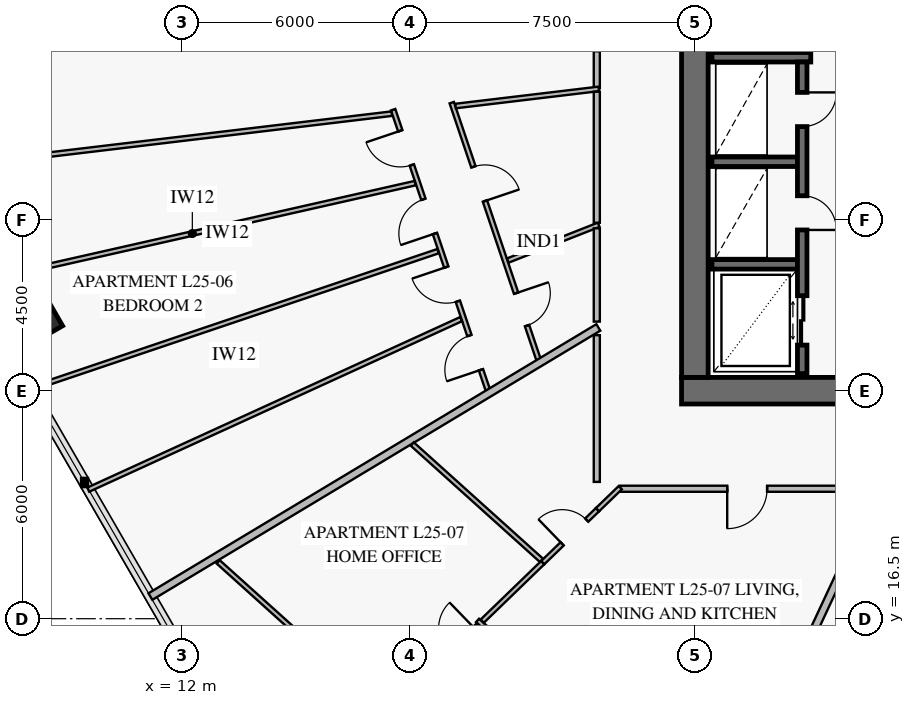
"""IFC4 building model, lengths in metres.
Left out: names, types, materials, properties, quantities, classifications, styles, units other than length and angle.
Written with IfcOpenShell. Run it as: python <this file> out.ifc"""

import sys

from ifc_helpers import new_model, si_unit, direction, frame, frame_2d, origin, origin_2d, place, context, subcontext, project, spatial, rectangle, extrude, element, fill, save


model = new_model("IFC4")
c1 = context("Model", 3, precision=1e-05, world=origin(), true_north=direction((0.0, 1.0)))
c2 = subcontext(c1, "Body", "Model", "MODEL_VIEW")
j1 = project(units=[si_unit("LENGTHUNIT", "METRE"), si_unit("PLANEANGLEUNIT", "RADIAN")], contexts=[c1])
p1 = place(None, origin())
s1 = spatial("IfcSite", under=j1, at=p1, CompositionType="ELEMENT")
p2 = place(p1, origin())
s2 = spatial("IfcBuilding", under=s1, at=p2, CompositionType="ELEMENT")
p3 = place(p2, frame((0.0, 0.0, 103.8)))
s3 = spatial("IfcBuildingStorey", under=s2, at=p3, CompositionType="ELEMENT", Elevation=103.8)
p4 = place(p3, frame((25.15, 22.5, 0.0), z_axis=(0.0, 0.0, 1.0), x_axis=(1.0, 0.0, 0.0)))
e1 = element("IfcWall", 1, at=p4, inside=s3, PredefinedType="SHEAR", context=c2, shape_type="SweptSolid", body=[
    extrude(rectangle(XDim=9.9, YDim=0.7, at=frame_2d((4.95, 0.0))), origin(), (0.0, 0.0, 1.0), 3.8),
])
p5 = place(p4, frame((4.25, 0.0, 0.0)))
e2 = element("IfcOpeningElement", 2, at=p5, cuts=e1, PredefinedType="OPENING", context=c2, shape_type="SweptSolid", body=[
    extrude(rectangle(XDim=1.5, YDim=2.15, at=frame_2d((0.75, 1.075))), frame((0.0, 0.362, 0.0), z_axis=(0.0, -1.0, 0.0), x_axis=(1.0, 0.0, 0.0)), (0.0, 0.0, 1.0), 0.724),
])
p6 = place(p3, frame((25.5, 22.85, 0.0), z_axis=(0.0, 0.0, 1.0), x_axis=(0.0, 1.0, 0.0)))
e3 = element("IfcWall", 3, at=p6, inside=s3, PredefinedType="SHEAR", context=c2, shape_type="SweptSolid", body=[
    extrude(rectangle(XDim=18.3, YDim=0.7, at=frame_2d((9.15, 0.0))), origin(), (0.0, 0.0, 1.0), 3.8),
])
p7 = place(p6, frame((8.9, 0.0, 0.0)))
e4 = element("IfcOpeningElement", 4, at=p7, cuts=e3, PredefinedType="OPENING", context=c2, shape_type="SweptSolid", body=[
    extrude(rectangle(XDim=1.1, YDim=2.15, at=frame_2d((0.55, 1.075))), frame((0.0, 0.362, 0.0), z_axis=(0.0, -1.0, 0.0), x_axis=(1.0, 0.0, 0.0)), (0.0, 0.0, 1.0), 0.724),
])
p8 = place(p3, frame((8.111, 24.408, 0.0), z_axis=(0.0, 0.0, 1.0), x_axis=(0.5, -0.866025403784, 0.0)))
e5 = element("IfcColumn", 5, at=p8, inside=s3, PredefinedType="COLUMN", context=c2, shape_type="SweptSolid", body=[
    extrude(rectangle(XDim=1.1, YDim=1.1, at=origin_2d()), origin(), (0.0, 0.0, 1.0), 3.55),
])
p9 = place(p3, frame((25.95, 31.275, 0.0), z_axis=(0.0, 0.0, 1.0), x_axis=(1.0, 0.0, 0.0)))
e6 = element("IfcWall", 6, at=p9, inside=s3, PredefinedType="SOLIDWALL", context=c2, shape_type="SweptSolid", body=[
    extrude(rectangle(XDim=20.1, YDim=0.25, at=frame_2d((10.05, 0.0))), origin(), (0.0, 0.0, 1.0), 3.8),
])
p10 = place(p9, frame((2.6, 0.0, 0.0)))
e7 = element("IfcOpeningElement", 7, at=p10, cuts=e6, PredefinedType="OPENING", context=c2, shape_type="SweptSolid", body=[
    extrude(rectangle(XDim=1.1, YDim=2.15, at=frame_2d((0.55, 1.075))), frame((0.0, 0.137, 0.0), z_axis=(0.0, -1.0, 0.0), x_axis=(1.0, 0.0, 0.0)), (0.0, 0.0, 1.0), 0.274),
])
p11 = place(p9, frame((10.6, 0.0, 0.0)))
e8 = element("IfcOpeningElement", 8, at=p11, cuts=e6, PredefinedType="OPENING", context=c2, shape_type="SweptSolid", body=[
    extrude(rectangle(XDim=1.1, YDim=2.15, at=frame_2d((0.55, 1.075))), frame((0.0, 0.137, 0.0), z_axis=(0.0, -1.0, 0.0), x_axis=(1.0, 0.0, 0.0)), (0.0, 0.0, 1.0), 0.274),
])
p12 = place(p9, frame((16.35, 0.0, 0.0)))
e9 = element("IfcOpeningElement", 9, at=p12, cuts=e6, PredefinedType="OPENING", context=c2, shape_type="SweptSolid", body=[
    extrude(rectangle(XDim=1.1, YDim=2.15, at=frame_2d((0.55, 1.075))), frame((0.0, 0.137, 0.0), z_axis=(0.0, -1.0, 0.0), x_axis=(1.0, 0.0, 0.0)), (0.0, 0.0, 1.0), 0.274),
])
for number, where, z_axis, x_axis in (
    (10, (25.95, 25.825, 0.0), (0.0, 0.0, 1.0), (1.0, 0.0, 0.0)),
    (11, (25.95, 28.525, 0.0), (0.0, 0.0, 1.0), (1.0, 0.0, 0.0)),
):
    element("IfcWall", number, at=place(p3, frame(where, z_axis=z_axis, x_axis=x_axis)), inside=s3, PredefinedType="SOLIDWALL", context=c2, shape_type="SweptSolid", body=[
        extrude(rectangle(XDim=2.25, YDim=0.25, at=frame_2d((1.125, 0.0))), origin(), (0.0, 0.0, 1.0), 3.8),
    ])
p13 = place(p3, frame((28.325, 22.95, 0.0), z_axis=(0.0, 0.0, 1.0), x_axis=(0.0, 1.0, 0.0)))
e12 = element("IfcWall", 12, at=p13, inside=s3, PredefinedType="SOLIDWALL", context=c2, shape_type="SweptSolid", body=[
    extrude(rectangle(XDim=8.2, YDim=0.25, at=frame_2d((4.1, 0.0))), origin(), (0.0, 0.0, 1.0), 3.8),
])
p14 = place(p13, frame((0.75, 0.0, 0.0)))
e13 = element("IfcOpeningElement", 13, at=p14, cuts=e12, PredefinedType="OPENING", context=c2, shape_type="SweptSolid", body=[
    extrude(rectangle(XDim=1.3, YDim=2.3, at=frame_2d((0.65, 1.15))), frame((0.0, 0.137, 0.0), z_axis=(0.0, -1.0, 0.0), x_axis=(1.0, 0.0, 0.0)), (0.0, 0.0, 1.0), 0.274),
])
p15 = place(p13, frame((3.78, 0.0, 0.0)))
e14 = element("IfcOpeningElement", 14, at=p15, cuts=e12, PredefinedType="OPENING", context=c2, shape_type="SweptSolid", body=[
    extrude(rectangle(XDim=0.9, YDim=2.1, at=frame_2d((0.45, 1.05))), frame((0.0, 0.137, 0.0), z_axis=(0.0, -1.0, 0.0), x_axis=(1.0, 0.0, 0.0)), (0.0, 0.0, 1.0), 0.274),
])
p16 = place(p13, frame((6.5, 0.0, 0.0)))
e15 = element("IfcOpeningElement", 15, at=p16, cuts=e12, PredefinedType="OPENING", context=c2, shape_type="SweptSolid", body=[
    extrude(rectangle(XDim=0.9, YDim=2.1, at=frame_2d((0.45, 1.05))), frame((0.0, 0.137, 0.0), z_axis=(0.0, -1.0, 0.0), x_axis=(1.0, 0.0, 0.0)), (0.0, 0.0, 1.0), 0.274),
])
p17 = place(p3, frame((19.103, 30.08, 0.0), z_axis=(0.0, 0.0, 1.0), x_axis=(0.319961945867, -0.947430394909, 0.0)))
e16 = element("IfcWall", 16, at=p17, inside=s3, PredefinedType="PARTITIONING", context=c2, shape_type="SweptSolid", body=[
    extrude(rectangle(XDim=7.174, YDim=0.12, at=frame_2d((3.587, 0.0))), origin(), (0.0, 0.0, 1.0), 2.85),
])
p18 = place(p17, frame((1.782, 0.0, 0.0)))
e17 = element("IfcOpeningElement", 17, at=p18, cuts=e16, PredefinedType="OPENING", context=c2, shape_type="SweptSolid", body=[
    extrude(rectangle(XDim=0.95, YDim=2.1, at=frame_2d((0.475, 1.05))), frame((0.0, 0.072, 0.0), z_axis=(0.0, -1.0, 0.0), x_axis=(1.0, 0.0, 0.0)), (0.0, 0.0, 1.0), 0.144),
])
p19 = place(p17, frame((5.292, 0.0, 0.0)))
e18 = element("IfcOpeningElement", 18, at=p19, cuts=e16, PredefinedType="OPENING", context=c2, shape_type="SweptSolid", body=[
    extrude(rectangle(XDim=0.9, YDim=2.1, at=frame_2d((0.45, 1.05))), frame((0.0, 0.072, 0.0), z_axis=(0.0, -1.0, 0.0), x_axis=(1.0, 0.0, 0.0)), (0.0, 0.0, 1.0), 0.144),
])
p20 = place(p3, frame((17.561, 29.896, 0.0), z_axis=(0.0, 0.0, 1.0), x_axis=(0.319947688878, -0.947435209596, 0.0)))
e19 = element("IfcWall", 19, at=p20, inside=s3, PredefinedType="PARTITIONING", context=c2, shape_type="SweptSolid", body=[
    extrude(rectangle(XDim=7.812, YDim=0.12, at=frame_2d((3.906, 0.0))), origin(), (0.0, 0.0, 1.0), 2.85),
])
p21 = place(p20, frame((0.587, 0.0, 0.0)))
e20 = element("IfcOpeningElement", 20, at=p21, cuts=e19, PredefinedType="OPENING", context=c2, shape_type="SweptSolid", body=[
    extrude(rectangle(XDim=0.95, YDim=2.1, at=frame_2d((0.475, 1.05))), frame((0.0, 0.072, 0.0), z_axis=(0.0, -1.0, 0.0), x_axis=(1.0, 0.0, 0.0)), (0.0, 0.0, 1.0), 0.144),
])
p22 = place(p20, frame((2.49, 0.0, 0.0)))
e21 = element("IfcOpeningElement", 21, at=p22, cuts=e19, PredefinedType="OPENING", context=c2, shape_type="SweptSolid", body=[
    extrude(rectangle(XDim=0.95, YDim=2.1, at=frame_2d((0.475, 1.05))), frame((0.0, 0.072, 0.0), z_axis=(0.0, -1.0, 0.0), x_axis=(1.0, 0.0, 0.0)), (0.0, 0.0, 1.0), 0.144),
])
p23 = place(p20, frame((4.372, 0.0, 0.0)))
e22 = element("IfcOpeningElement", 22, at=p23, cuts=e19, PredefinedType="OPENING", context=c2, shape_type="SweptSolid", body=[
    extrude(rectangle(XDim=0.95, YDim=2.1, at=frame_2d((0.475, 1.05))), frame((0.0, 0.072, 0.0), z_axis=(0.0, -1.0, 0.0), x_axis=(1.0, 0.0, 0.0)), (0.0, 0.0, 1.0), 0.144),
])
p24 = place(p20, frame((6.274, 0.0, 0.0)))
e23 = element("IfcOpeningElement", 23, at=p24, cuts=e19, PredefinedType="OPENING", context=c2, shape_type="SweptSolid", body=[
    extrude(rectangle(XDim=0.95, YDim=2.1, at=frame_2d((0.475, 1.05))), frame((0.0, 0.072, 0.0), z_axis=(0.0, -1.0, 0.0), x_axis=(1.0, 0.0, 0.0)), (0.0, 0.0, 1.0), 0.144),
])
p25 = place(p3, frame((22.92, 33.47, 0.0), z_axis=(0.0, 0.0, 1.0), x_axis=(0.0, -1.0, 0.0)))
e24 = element("IfcWall", 24, at=p25, inside=s3, PredefinedType="PARTITIONING", context=c2, shape_type="SweptSolid", body=[
    extrude(rectangle(XDim=3.014, YDim=0.16, at=frame_2d((1.507, 0.0))), origin(), (0.0, 0.0, 1.0), 3.55),
])
p26 = place(p25, frame((0.982, 0.0, 0.0)))
e25 = element("IfcOpeningElement", 25, at=p26, cuts=e24, PredefinedType="OPENING", context=c2, shape_type="SweptSolid", body=[
    extrude(rectangle(XDim=1.05, YDim=2.15, at=frame_2d((0.525, 1.075))), frame((0.0, 0.092, 0.0), z_axis=(0.0, -1.0, 0.0), x_axis=(1.0, 0.0, 0.0)), (0.0, 0.0, 1.0), 0.184),
])
p27 = place(p3, frame((19.781, 16.455, 0.0), z_axis=(0.0, 0.0, 1.0), x_axis=(0.743143681273, -0.669131877125, 0.0)))
e26 = element("IfcWall", 26, at=p27, inside=s3, PredefinedType="PARTITIONING", context=c2, shape_type="SweptSolid", body=[
    extrude(rectangle(XDim=8.392, YDim=0.12, at=frame_2d((4.196, 0.0))), origin(), (0.0, 0.0, 1.0), 2.85),
])
p28 = place(p27, frame((0.989, 0.0, 0.0)))
e27 = element("IfcOpeningElement", 27, at=p28, cuts=e26, PredefinedType="OPENING", context=c2, shape_type="SweptSolid", body=[
    extrude(rectangle(XDim=0.95, YDim=2.1, at=frame_2d((0.475, 1.05))), frame((0.0, 0.072, 0.0), z_axis=(0.0, -1.0, 0.0), x_axis=(1.0, 0.0, 0.0)), (0.0, 0.0, 1.0), 0.144),
])
p29 = place(p27, frame((4.945, 0.0, 0.0)))
e28 = element("IfcOpeningElement", 28, at=p29, cuts=e26, PredefinedType="OPENING", context=c2, shape_type="SweptSolid", body=[
    extrude(rectangle(XDim=0.95, YDim=2.1, at=frame_2d((0.475, 1.05))), frame((0.0, 0.072, 0.0), z_axis=(0.0, -1.0, 0.0), x_axis=(1.0, 0.0, 0.0)), (0.0, 0.0, 1.0), 0.144),
])
p30 = place(p3, frame((22.938, 19.368, 0.0), z_axis=(0.0, 0.0, 1.0), x_axis=(-0.718812006411, -0.695204501884, 0.0)))
e29 = element("IfcWall", 29, at=p30, inside=s3, PredefinedType="PARTITIONING", context=c2, shape_type="SweptSolid", body=[
    extrude(rectangle(XDim=2.006, YDim=0.12, at=frame_2d((1.003, 0.0))), origin(), (0.0, 0.0, 1.0), 3.55),
])
p31 = place(p30, frame((0.393, 0.0, 0.0)))
e30 = element("IfcOpeningElement", 30, at=p31, cuts=e29, PredefinedType="OPENING", context=c2, shape_type="SweptSolid", body=[
    extrude(rectangle(XDim=0.9, YDim=2.1, at=frame_2d((0.45, 1.05))), frame((0.0, 0.072, 0.0), z_axis=(0.0, -1.0, 0.0), x_axis=(1.0, 0.0, 0.0)), (0.0, 0.0, 1.0), 0.144),
])
p32 = place(p3, frame((21.496, 17.974, 0.0), z_axis=(0.0, 0.0, 1.0), x_axis=(-0.718868898455, -0.695145673103, 0.0)))
e31 = element("IfcWall", 31, at=p32, inside=s3, PredefinedType="PARTITIONING", context=c2, shape_type="SweptSolid", body=[
    extrude(rectangle(XDim=2.213, YDim=0.12, at=frame_2d((1.106, 0.0))), origin(), (0.0, 0.0, 1.0), 3.1),
])
p33 = place(p3, frame((19.807, 16.341, 0.0), z_axis=(0.0, 0.0, 1.0), x_axis=(-0.718831046799, -0.69518481439, 0.0)))
e32 = element("IfcWall", 32, at=p33, inside=s3, PredefinedType="PARTITIONING", context=c2, shape_type="SweptSolid", body=[
    extrude(rectangle(XDim=3.386, YDim=0.12, at=frame_2d((1.693, 0.0))), origin(), (0.0, 0.0, 1.0), 3.55),
])
p34 = place(p33, frame((0.14, 0.0, 0.0)))
e33 = element("IfcOpeningElement", 33, at=p34, cuts=e32, PredefinedType="OPENING", context=c2, shape_type="SweptSolid", body=[
    extrude(rectangle(XDim=0.95, YDim=2.1, at=frame_2d((0.475, 1.05))), frame((0.0, 0.072, 0.0), z_axis=(0.0, -1.0, 0.0), x_axis=(1.0, 0.0, 0.0)), (0.0, 0.0, 1.0), 0.144),
])
p35 = place(p3, frame((12.957, 17.996, 0.0), z_axis=(0.0, 0.0, 1.0), x_axis=(0.743162407379, -0.669111079163, 0.0)))
e34 = element("IfcWall", 34, at=p35, inside=s3, PredefinedType="PARTITIONING", context=c2, shape_type="SweptSolid", body=[
    extrude(rectangle(XDim=5.898, YDim=0.12, at=frame_2d((2.949, 0.0))), origin(), (0.0, 0.0, 1.0), 3.55),
])
p36 = place(p35, frame((2.558, 0.0, 0.0)))
e35 = element("IfcOpeningElement", 35, at=p36, cuts=e34, PredefinedType="OPENING", context=c2, shape_type="SweptSolid", body=[
    extrude(rectangle(XDim=0.95, YDim=2.1, at=frame_2d((0.475, 1.05))), frame((0.0, 0.072, 0.0), z_axis=(0.0, -1.0, 0.0), x_axis=(1.0, 0.0, 0.0)), (0.0, 0.0, 1.0), 0.144),
])
p37 = place(p3, frame((23.537, 19.92, 0.0), z_axis=(0.0, 0.0, 1.0), x_axis=(1.0, 0.0, 0.0)))
e36 = element("IfcWall", 36, at=p37, inside=s3, PredefinedType="PARTITIONING", context=c2, shape_type="SweptSolid", body=[
    extrude(rectangle(XDim=6.679, YDim=0.16, at=frame_2d((3.339, 0.0))), origin(), (0.0, 0.0, 1.0), 2.85),
])
p38 = place(p37, frame((2.814, 0.0, 0.0)))
e37 = element("IfcOpeningElement", 37, at=p38, cuts=e36, PredefinedType="OPENING", context=c2, shape_type="SweptSolid", body=[
    extrude(rectangle(XDim=1.05, YDim=2.15, at=frame_2d((0.525, 1.075))), frame((0.0, 0.092, 0.0), z_axis=(0.0, -1.0, 0.0), x_axis=(1.0, 0.0, 0.0)), (0.0, 0.0, 1.0), 0.184),
])
p39 = place(p3, frame((22.97, 26.867, 0.0), z_axis=(0.0, 0.0, 1.0), x_axis=(-0.930402504974, -0.366539464095, 0.0)))
e38 = element("IfcWall", 38, at=p39, inside=s3, PredefinedType="PARTITIONING", context=c2, shape_type="SweptSolid", body=[
    extrude(rectangle(XDim=2.571, YDim=0.12, at=frame_2d((1.286, 0.0))), origin(), (0.0, 0.0, 1.0), 3.55),
])
p40 = place(p3, frame((18.142, 27.962, 0.0), z_axis=(0.0, 0.0, 1.0), x_axis=(-0.975378348773, -0.220538152583, 0.0)))
e39 = element("IfcWall", 39, at=p40, inside=s3, PredefinedType="PARTITIONING", context=c2, shape_type="SweptSolid", body=[
    extrude(rectangle(XDim=12.026, YDim=0.12, at=frame_2d((6.013, 0.0))), origin(), (0.0, 0.0, 1.0), 2.8),
])
p41 = place(p3, frame((18.746, 26.173, 0.0), z_axis=(0.0, 0.0, 1.0), x_axis=(-0.947430912787, -0.319960412389, 0.0)))
e40 = element("IfcWall", 40, at=p41, inside=s3, PredefinedType="PARTITIONING", context=c2, shape_type="SweptSolid", body=[
    extrude(rectangle(XDim=11.334, YDim=0.12, at=frame_2d((5.667, 0.0))), origin(), (0.0, 0.0, 1.0), 2.8),
])
p42 = place(p3, frame((19.35, 24.384, 0.0), z_axis=(0.0, 0.0, 1.0), x_axis=(-0.909372754927, -0.415982202259, 0.0)))
e41 = element("IfcWall", 41, at=p42, inside=s3, PredefinedType="PARTITIONING", context=c2, shape_type="SweptSolid", body=[
    extrude(rectangle(XDim=10.79, YDim=0.12, at=frame_2d((5.395, 0.0))), origin(), (0.0, 0.0, 1.0), 2.8),
])
p43 = place(p3, frame((22.97, 30.442, 0.0), z_axis=(0.0, 0.0, 1.0), x_axis=(-0.992919730028, -0.118787245617, 0.0)))
e42 = element("IfcWall", 42, at=p43, inside=s3, PredefinedType="PARTITIONING", context=c2, shape_type="SweptSolid", body=[
    extrude(rectangle(XDim=3.792, YDim=0.12, at=frame_2d((1.896, 0.0))), origin(), (0.0, 0.0, 1.0), 3.55),
])
p44 = place(p3, frame((17.525, 29.79, 0.0), z_axis=(0.0, 0.0, 1.0), x_axis=(-0.992925874221, -0.11873587622, 0.0)))
e43 = element("IfcWall", 43, at=p44, inside=s3, PredefinedType="PARTITIONING", context=c2, shape_type="SweptSolid", body=[
    extrude(rectangle(XDim=9.501, YDim=0.12, at=frame_2d((4.751, 0.0))), origin(), (0.0, 0.0, 1.0), 2.8),
])
p45 = place(p3, frame((22.96, 24.165, 0.0), z_axis=(0.0, 0.0, 1.0), x_axis=(-0.857163744899, -0.515043992714, 0.0)))
e44 = element("IfcWall", 44, at=p45, inside=s3, PredefinedType="PARTITIONING", context=c2, shape_type="SweptSolid", body=[
    extrude(rectangle(XDim=13.75, YDim=0.2, at=frame_2d((6.875, 0.0))), origin(), (0.0, 0.0, 1.0), 2.8),
])
p46 = place(p3, frame((23.537, 19.948, 0.0), z_axis=(0.0, 0.0, 1.0), x_axis=(-0.719012767995, -0.694996862914, 0.0)))
e45 = element("IfcWall", 45, at=p46, inside=s3, PredefinedType="PARTITIONING", context=c2, shape_type="SweptSolid", body=[
    extrude(rectangle(XDim=0.833, YDim=0.12, at=frame_2d((0.417, 0.0))), origin(), (0.0, 0.0, 1.0), 2.85),
])
p47 = place(p3, frame((18.064, 21.097, 0.0), z_axis=(0.0, 0.0, 1.0), x_axis=(0.743156109258, -0.669118074238, 0.0)))
e46 = element("IfcWall", 46, at=p47, inside=s3, PredefinedType="PARTITIONING", context=c2, shape_type="SweptSolid", body=[
    extrude(rectangle(XDim=4.574, YDim=0.12, at=frame_2d((2.287, 0.0))), origin(), (0.0, 0.0, 1.0), 3.1),
])
p48 = place(p3, frame((30.386, 19.96, 0.0), z_axis=(0.0, 0.0, 1.0), x_axis=(-0.422626983595, -0.906303719918, 0.0)))
e47 = element("IfcWall", 47, at=p48, inside=s3, PredefinedType="PARTITIONING", context=c2, shape_type="SweptSolid", body=[
    extrude(rectangle(XDim=18.667, YDim=0.2, at=frame_2d((9.334, 0.0))), origin(), (0.0, 0.0, 1.0), 2.8),
])
p49 = place(p3, frame((22.92, 30.367, 0.0), z_axis=(0.0, 0.0, 1.0), x_axis=(0.0, -1.0, 0.0)))
e48 = element("IfcWall", 48, at=p49, inside=s3, PredefinedType="PARTITIONING", context=c2, shape_type="SweptSolid", body=[
    extrude(rectangle(XDim=3.447, YDim=0.16, at=frame_2d((1.723, 0.0))), origin(), (0.0, 0.0, 1.0), 2.85),
])
p50 = place(p3, frame((22.92, 26.774, 0.0), z_axis=(0.0, 0.0, 1.0), x_axis=(0.0, -1.0, 0.0)))
e49 = element("IfcWall", 49, at=p50, inside=s3, PredefinedType="PARTITIONING", context=c2, shape_type="SweptSolid", body=[
    extrude(rectangle(XDim=2.456, YDim=0.16, at=frame_2d((1.228, 0.0))), origin(), (0.0, 0.0, 1.0), 3.55),
])
p51 = place(p3, frame((22.92, 23.961, 0.0), z_axis=(0.0, 0.0, 1.0), x_axis=(0.0, -1.0, 0.0)))
e50 = element("IfcWall", 50, at=p51, inside=s3, PredefinedType="PARTITIONING", context=c2, shape_type="SweptSolid", body=[
    extrude(rectangle(XDim=3.861, YDim=0.16, at=frame_2d((1.931, 0.0))), origin(), (0.0, 0.0, 1.0), 3.55),
])
p52 = place(p10, origin())
e51 = element("IfcDoor", 51, at=p52, inside=s3, OperationType="SINGLE_SWING_LEFT", PredefinedType="USERDEFINED", context=c2, shape_type="SweptSolid", body=[
    extrude(rectangle(XDim=1.1, YDim=2.15, at=frame_2d((0.55, 1.075))), frame((0.0, 0.025, 0.0), z_axis=(0.0, -1.0, 0.0), x_axis=(1.0, 0.0, 0.0)), (0.0, 0.0, 1.0), 0.05),
])
fill(e7, e51)
p53 = place(p14, frame((1.3, 0.0, 0.0), z_axis=(0.0, 0.0, 1.0), x_axis=(-1.0, 0.0, 0.0)))
e52 = element("IfcDoor", 52, at=p53, inside=s3, OperationType="DOUBLE_DOOR_SLIDING", PredefinedType="DOOR", context=c2, shape_type="SweptSolid", body=[
    extrude(rectangle(XDim=1.3, YDim=2.3, at=frame_2d((0.65, 1.15))), frame((0.0, 0.025, 0.0), z_axis=(0.0, -1.0, 0.0), x_axis=(1.0, 0.0, 0.0)), (0.0, 0.0, 1.0), 0.05),
])
fill(e13, e52)
p54 = place(p15, frame((0.9, 0.0, 0.0), z_axis=(0.0, 0.0, 1.0), x_axis=(-1.0, 0.0, 0.0)))
e53 = element("IfcDoor", 53, at=p54, inside=s3, OperationType="SINGLE_SWING_RIGHT", PredefinedType="DOOR", context=c2, shape_type="SweptSolid", body=[
    extrude(rectangle(XDim=0.9, YDim=2.1, at=frame_2d((0.45, 1.05))), frame((0.0, 0.025, 0.0), z_axis=(0.0, -1.0, 0.0), x_axis=(1.0, 0.0, 0.0)), (0.0, 0.0, 1.0), 0.05),
])
fill(e14, e53)
p55 = place(p16, frame((0.9, 0.0, 0.0), z_axis=(0.0, 0.0, 1.0), x_axis=(-1.0, 0.0, 0.0)))
e54 = element("IfcDoor", 54, at=p55, inside=s3, OperationType="SINGLE_SWING_LEFT", PredefinedType="DOOR", context=c2, shape_type="SweptSolid", body=[
    extrude(rectangle(XDim=0.9, YDim=2.1, at=frame_2d((0.45, 1.05))), frame((0.0, 0.025, 0.0), z_axis=(0.0, -1.0, 0.0), x_axis=(1.0, 0.0, 0.0)), (0.0, 0.0, 1.0), 0.05),
])
fill(e15, e54)
p56 = place(p18, origin())
e55 = element("IfcDoor", 55, at=p56, inside=s3, OperationType="SINGLE_SWING_RIGHT", PredefinedType="DOOR", context=c2, shape_type="SweptSolid", body=[
    extrude(rectangle(XDim=0.95, YDim=2.1, at=frame_2d((0.475, 1.05))), frame((0.0, 0.025, 0.0), z_axis=(0.0, -1.0, 0.0), x_axis=(1.0, 0.0, 0.0)), (0.0, 0.0, 1.0), 0.05),
])
fill(e17, e55)
p57 = place(p19, origin())
e56 = element("IfcDoor", 56, at=p57, inside=s3, OperationType="SINGLE_SWING_LEFT", PredefinedType="DOOR", context=c2, shape_type="SweptSolid", body=[
    extrude(rectangle(XDim=0.9, YDim=2.1, at=frame_2d((0.45, 1.05))), frame((0.0, 0.025, 0.0), z_axis=(0.0, -1.0, 0.0), x_axis=(1.0, 0.0, 0.0)), (0.0, 0.0, 1.0), 0.05),
])
fill(e18, e56)
p58 = place(p21, frame((0.95, 0.0, 0.0), z_axis=(0.0, 0.0, 1.0), x_axis=(-1.0, 0.0, 0.0)))
e57 = element("IfcDoor", 57, at=p58, inside=s3, OperationType="SINGLE_SWING_RIGHT", PredefinedType="DOOR", context=c2, shape_type="SweptSolid", body=[
    extrude(rectangle(XDim=0.95, YDim=2.1, at=frame_2d((0.475, 1.05))), frame((0.0, 0.025, 0.0), z_axis=(0.0, -1.0, 0.0), x_axis=(1.0, 0.0, 0.0)), (0.0, 0.0, 1.0), 0.05),
])
fill(e20, e57)
p59 = place(p22, frame((0.95, 0.0, 0.0), z_axis=(0.0, 0.0, 1.0), x_axis=(-1.0, 0.0, 0.0)))
e58 = element("IfcDoor", 58, at=p59, inside=s3, OperationType="SINGLE_SWING_LEFT", PredefinedType="DOOR", context=c2, shape_type="SweptSolid", body=[
    extrude(rectangle(XDim=0.95, YDim=2.1, at=frame_2d((0.475, 1.05))), frame((0.0, 0.025, 0.0), z_axis=(0.0, -1.0, 0.0), x_axis=(1.0, 0.0, 0.0)), (0.0, 0.0, 1.0), 0.05),
])
fill(e21, e58)
p60 = place(p23, frame((0.95, 0.0, 0.0), z_axis=(0.0, 0.0, 1.0), x_axis=(-1.0, 0.0, 0.0)))
e59 = element("IfcDoor", 59, at=p60, inside=s3, OperationType="SINGLE_SWING_RIGHT", PredefinedType="DOOR", context=c2, shape_type="SweptSolid", body=[
    extrude(rectangle(XDim=0.95, YDim=2.1, at=frame_2d((0.475, 1.05))), frame((0.0, 0.025, 0.0), z_axis=(0.0, -1.0, 0.0), x_axis=(1.0, 0.0, 0.0)), (0.0, 0.0, 1.0), 0.05),
])
fill(e22, e59)
p61 = place(p24, frame((0.95, 0.0, 0.0), z_axis=(0.0, 0.0, 1.0), x_axis=(-1.0, 0.0, 0.0)))
e60 = element("IfcDoor", 60, at=p61, inside=s3, OperationType="SINGLE_SWING_LEFT", PredefinedType="DOOR", context=c2, shape_type="SweptSolid", body=[
    extrude(rectangle(XDim=0.95, YDim=2.1, at=frame_2d((0.475, 1.05))), frame((0.0, 0.025, 0.0), z_axis=(0.0, -1.0, 0.0), x_axis=(1.0, 0.0, 0.0)), (0.0, 0.0, 1.0), 0.05),
])
fill(e23, e60)
p62 = place(p31, frame((0.9, 0.0, 0.0), z_axis=(0.0, 0.0, 1.0), x_axis=(-1.0, 0.0, 0.0)))
e61 = element("IfcDoor", 61, at=p62, inside=s3, OperationType="SINGLE_SWING_LEFT", PredefinedType="DOOR", context=c2, shape_type="SweptSolid", body=[
    extrude(rectangle(XDim=0.9, YDim=2.1, at=frame_2d((0.45, 1.05))), frame((0.0, 0.025, 0.0), z_axis=(0.0, -1.0, 0.0), x_axis=(1.0, 0.0, 0.0)), (0.0, 0.0, 1.0), 0.05),
])
fill(e30, e61)
p63 = place(p38, frame((1.05, 0.0, 0.0), z_axis=(0.0, 0.0, 1.0), x_axis=(-1.0, 0.0, 0.0)))
e62 = element("IfcDoor", 62, at=p63, inside=s3, OperationType="SINGLE_SWING_RIGHT", PredefinedType="DOOR", context=c2, shape_type="SweptSolid", body=[
    extrude(rectangle(XDim=1.05, YDim=2.15, at=frame_2d((0.525, 1.075))), frame((0.0, 0.025, 0.0), z_axis=(0.0, -1.0, 0.0), x_axis=(1.0, 0.0, 0.0)), (0.0, 0.0, 1.0), 0.05),
])
fill(e37, e62)
save(model, sys.argv[1])
